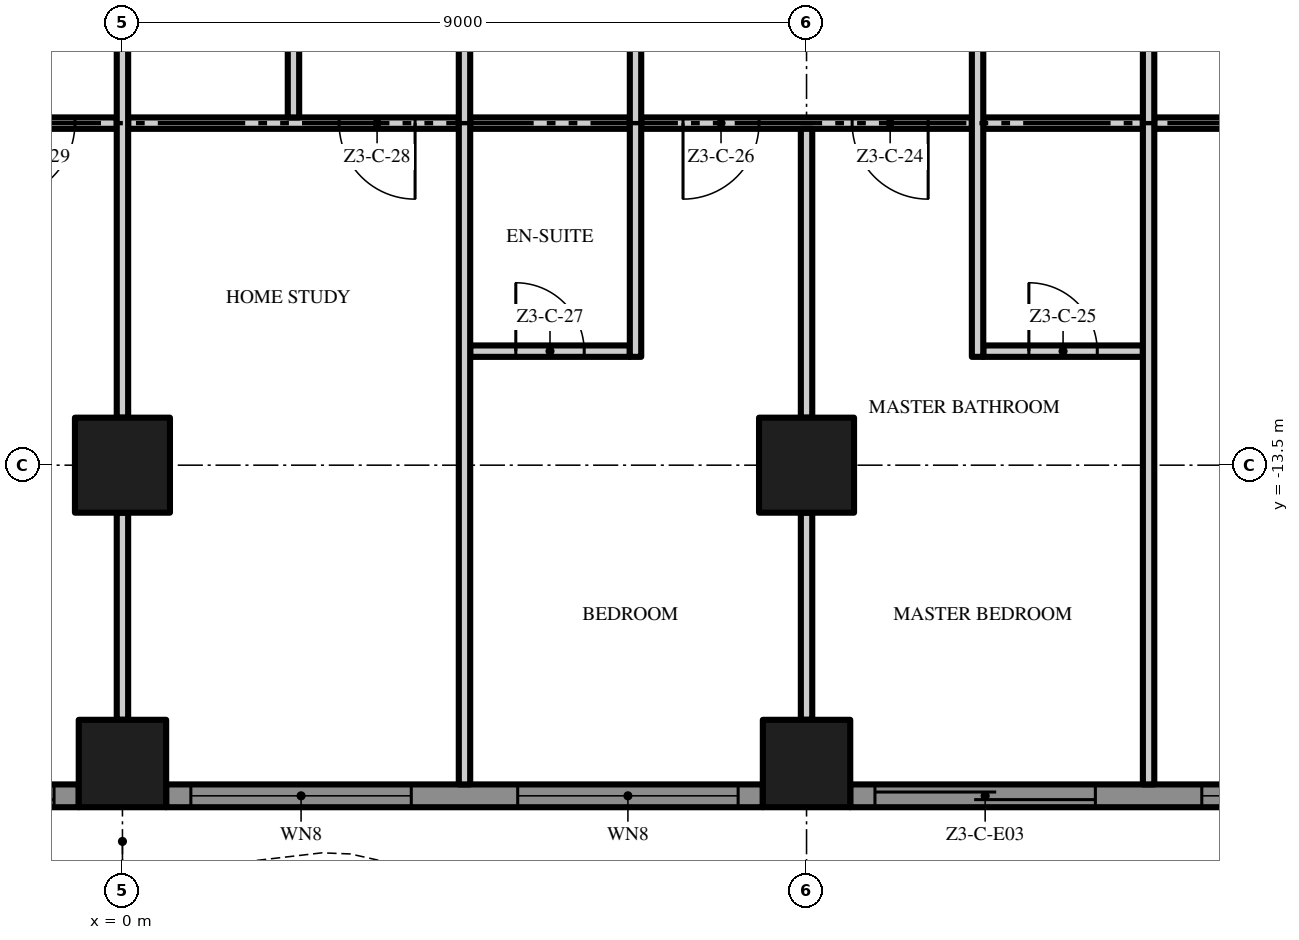
"""IFC4 building model, lengths in metres.
Left out: names, types, materials, properties, quantities, classifications, styles, units other than length and angle.
Written with IfcOpenShell. Run it as: python <this file> out.ifc"""

import sys

from ifc_helpers import new_model, si_unit, direction, frame, frame_2d, origin, origin_2d, place, context, subcontext, project, spatial, polyline, rectangle, outline, extrude, element, fill, save


model = new_model("IFC4")
c1 = context("Model", 3, precision=1e-05, world=origin(), true_north=direction((0.0, 1.0)))
c2 = subcontext(c1, "Body", "Model", "MODEL_VIEW")
j1 = project(units=[si_unit("LENGTHUNIT", "METRE"), si_unit("PLANEANGLEUNIT", "RADIAN")], contexts=[c1])
p1 = place(None, origin())
s1 = spatial("IfcSite", under=j1, at=p1, CompositionType="ELEMENT")
p2 = place(p1, origin())
s2 = spatial("IfcBuilding", under=s1, at=p2, CompositionType="ELEMENT")
p3 = place(p2, frame((0.0, 0.0, 155.4)))
s3 = spatial("IfcBuildingStorey", under=s2, at=p3, CompositionType="ELEMENT", Elevation=155.4)
p4 = place(p3, frame((0.0, -13.5, 0.0), z_axis=(0.0, 0.0, 1.0), x_axis=(1.0, 0.0, 0.0)))
e1 = element("IfcColumn", 1, at=p4, inside=s3, PredefinedType="COLUMN", context=c2, shape_type="SweptSolid", body=[
    extrude(rectangle(XDim=1.25, YDim=1.25, at=origin_2d()), origin(), (0.0, 0.0, 1.0), 3.5),
])
p5 = place(p3, frame((0.0, -17.425, 0.0), z_axis=(0.0, 0.0, 1.0), x_axis=(1.0, 0.0, 0.0)))
e2 = element("IfcColumn", 2, at=p5, inside=s3, PredefinedType="COLUMN", context=c2, shape_type="SweptSolid", body=[
    extrude(rectangle(XDim=1.15, YDim=1.15, at=origin_2d()), origin(), (0.0, 0.0, 1.0), 3.5),
])
p6 = place(p3, frame((9.0, -13.5, 0.0), z_axis=(0.0, 0.0, 1.0), x_axis=(1.0, 0.0, 0.0)))
e3 = element("IfcColumn", 3, at=p6, inside=s3, PredefinedType="COLUMN", context=c2, shape_type="SweptSolid", body=[
    extrude(rectangle(XDim=1.25, YDim=1.25, at=origin_2d()), origin(), (0.0, 0.0, 1.0), 3.5),
])
p7 = place(p3, frame((9.0, -17.425, 0.0), z_axis=(0.0, 0.0, 1.0), x_axis=(1.0, 0.0, 0.0)))
e4 = element("IfcColumn", 4, at=p7, inside=s3, PredefinedType="COLUMN", context=c2, shape_type="SweptSolid", body=[
    extrude(rectangle(XDim=1.15, YDim=1.15, at=origin_2d()), origin(), (0.0, 0.0, 1.0), 3.5),
])
p8 = place(p3, frame((-0.575, -17.85, 0.0), z_axis=(0.0, 0.0, 1.0), x_axis=(-1.0, 0.0, 0.0)))
e5 = element("IfcWall", 5, at=p8, inside=s3, PredefinedType="SOLIDWALL", context=c2, shape_type="SweptSolid", body=[
    extrude(rectangle(XDim=7.85, YDim=0.3, at=frame_2d((3.925, 0.0))), origin(), (0.0, 0.0, 1.0), 3.5),
])
p9 = place(p8, frame((4.625, 0.0, 0.0)))
e6 = element("IfcOpeningElement", 6, at=p9, cuts=e5, PredefinedType="OPENING", context=c2, shape_type="SweptSolid", body=[
    extrude(rectangle(XDim=2.9, YDim=2.4, at=frame_2d((1.45, 1.2))), frame((0.0, 0.16, 0.0), z_axis=(0.0, -1.0, 0.0), x_axis=(1.0, 0.0, 0.0)), (0.0, 0.0, 1.0), 0.32),
])
p10 = place(p8, frame((0.325, 0.0, 0.0)))
e7 = element("IfcOpeningElement", 7, at=p10, cuts=e5, PredefinedType="OPENING", context=c2, shape_type="SweptSolid", body=[
    extrude(rectangle(XDim=2.9, YDim=2.4, at=frame_2d((1.45, 1.2))), frame((0.0, 0.16, 0.0), z_axis=(0.0, -1.0, 0.0), x_axis=(1.0, 0.0, 0.0)), (0.0, 0.0, 1.0), 0.32),
])
p11 = place(p3, frame((8.425, -17.85, 0.0), z_axis=(0.0, 0.0, 1.0), x_axis=(-1.0, 0.0, 0.0)))
e8 = element("IfcWall", 8, at=p11, inside=s3, PredefinedType="SOLIDWALL", context=c2, shape_type="SweptSolid", body=[
    extrude(rectangle(XDim=7.85, YDim=0.3, at=frame_2d((3.925, 0.0))), origin(), (0.0, 0.0, 1.0), 3.5),
])
p12 = place(p11, frame((4.625, 0.0, 0.45)))
e9 = element("IfcOpeningElement", 9, at=p12, cuts=e8, PredefinedType="OPENING", context=c2, shape_type="SweptSolid", body=[
    extrude(rectangle(XDim=2.9, YDim=2.65, at=frame_2d((1.45, 1.325))), frame((0.0, 0.16, 0.0), z_axis=(0.0, -1.0, 0.0), x_axis=(1.0, 0.0, 0.0)), (0.0, 0.0, 1.0), 0.32),
])
p13 = place(p11, frame((0.325, 0.0, 0.45)))
e10 = element("IfcOpeningElement", 10, at=p13, cuts=e8, PredefinedType="OPENING", context=c2, shape_type="SweptSolid", body=[
    extrude(rectangle(XDim=2.9, YDim=2.65, at=frame_2d((1.45, 1.325))), frame((0.0, 0.16, 0.0), z_axis=(0.0, -1.0, 0.0), x_axis=(1.0, 0.0, 0.0)), (0.0, 0.0, 1.0), 0.32),
])
p14 = place(p3, frame((16.85, -17.85, 0.0), z_axis=(0.0, 0.0, 1.0), x_axis=(-1.0, 0.0, 0.0)))
e11 = element("IfcWall", 11, at=p14, inside=s3, PredefinedType="SOLIDWALL", context=c2, shape_type="SweptSolid", body=[
    extrude(rectangle(XDim=7.275, YDim=0.3, at=frame_2d((3.638, 0.0))), origin(), (0.0, 0.0, 1.0), 3.5),
])
p15 = place(p14, frame((4.05, 0.0, 0.0)))
e12 = element("IfcOpeningElement", 12, at=p15, cuts=e11, PredefinedType="OPENING", context=c2, shape_type="SweptSolid", body=[
    extrude(rectangle(XDim=2.9, YDim=2.4, at=frame_2d((1.45, 1.2))), frame((0.0, 0.16, 0.0), z_axis=(0.0, -1.0, 0.0), x_axis=(1.0, 0.0, 0.0)), (0.0, 0.0, 1.0), 0.32),
])
p16 = place(p14, frame((0.3, 0.0, 0.45)))
e13 = element("IfcOpeningElement", 13, at=p16, cuts=e11, PredefinedType="OPENING", context=c2, shape_type="SweptSolid", body=[
    extrude(rectangle(XDim=2.35, YDim=2.65, at=frame_2d((1.175, 1.325))), frame((0.0, 0.16, 0.0), z_axis=(0.0, -1.0, 0.0), x_axis=(1.0, 0.0, 0.0)), (0.0, 0.0, 1.0), 0.32),
])
p17 = place(p3, origin())
e14 = element("IfcWall", 14, at=p17, inside=s3, PredefinedType="USERDEFINED", context=c2, shape_type="SweptSolid", body=[
    extrude(outline(polyline([(-18.0, -20.649), (-16.5, -19.988), (-15.0, -19.255), (-13.5, -18.731), (-12.375, -18.6), (-12.0, -18.615), (-10.5, -18.951), (-9.0, -19.612), (-7.5, -20.345), (-6.0, -20.869), (-4.875, -21.0), (-4.5, -20.985), (-3.0, -20.649), (-1.5, -19.988), (0.0, -19.255), (1.5, -18.731), (2.625, -18.6), (3.0, -18.615), (4.5, -18.951), (6.0, -19.612), (7.5, -20.345), (9.0, -20.869), (10.125, -21.0), (10.5, -20.985), (12.0, -20.649), (13.5, -19.988), (15.0, -19.255), (16.5, -18.731), (17.625, -18.6), (18.0, -18.615), (18.01, -18.365), (17.615, -18.349), (16.444, -18.486), (14.904, -19.024), (13.395, -19.761), (11.921, -20.41), (10.467, -20.736), (10.135, -20.749), (9.056, -20.624), (7.596, -20.114), (6.105, -19.385), (4.579, -18.713), (3.033, -18.366), (2.615, -18.349), (1.444, -18.486), (-0.096, -19.024), (-1.605, -19.761), (-3.079, -20.41), (-4.533, -20.736), (-4.865, -20.749), (-5.944, -20.624), (-7.404, -20.114), (-8.895, -19.385), (-10.421, -18.713), (-11.967, -18.366), (-12.385, -18.349), (-13.556, -18.486), (-15.096, -19.024), (-16.605, -19.761), (-18.101, -20.42), (-18.0, -20.649)])), origin(), (0.0, 0.0, 1.0), 0.9),
])
p18 = place(p3, frame((4.575, -12.0, 0.0), z_axis=(0.0, 0.0, 1.0), x_axis=(1.0, 0.0, 0.0)))
e15 = element("IfcWall", 15, at=p18, inside=s3, PredefinedType="PARTITIONING", context=c2, shape_type="SweptSolid", body=[
    extrude(rectangle(XDim=2.1, YDim=0.15, at=frame_2d((1.05, 0.0))), origin(), (0.0, 0.0, 1.0), 3.5),
])
p19 = place(p18, frame((0.6, 0.0, 0.0)))
e16 = element("IfcOpeningElement", 16, at=p19, cuts=e15, PredefinedType="OPENING", context=c2, shape_type="SweptSolid", body=[
    extrude(rectangle(XDim=0.9, YDim=2.1, at=frame_2d((0.45, 1.05))), frame((0.0, 0.085, 0.0), z_axis=(0.0, -1.0, 0.0), x_axis=(1.0, 0.0, 0.0)), (0.0, 0.0, 1.0), 0.17),
])
p20 = place(p3, frame((11.325, -12.0, 0.0), z_axis=(0.0, 0.0, 1.0), x_axis=(1.0, 0.0, 0.0)))
e17 = element("IfcWall", 17, at=p20, inside=s3, PredefinedType="PARTITIONING", context=c2, shape_type="SweptSolid", body=[
    extrude(rectangle(XDim=2.1, YDim=0.15, at=frame_2d((1.05, 0.0))), origin(), (0.0, 0.0, 1.0), 3.5),
])
p21 = place(p20, frame((0.6, 0.0, 0.0)))
e18 = element("IfcOpeningElement", 18, at=p21, cuts=e17, PredefinedType="OPENING", context=c2, shape_type="SweptSolid", body=[
    extrude(rectangle(XDim=0.9, YDim=2.1, at=frame_2d((0.45, 1.05))), frame((0.0, 0.085, 0.0), z_axis=(0.0, -1.0, 0.0), x_axis=(1.0, 0.0, 0.0)), (0.0, 0.0, 1.0), 0.17),
])
p22 = place(p3, frame((-0.075, -9.0, 0.0), z_axis=(0.0, 0.0, 1.0), x_axis=(-1.0, 0.0, 0.0)))
e19 = element("IfcWall", 19, at=p22, inside=s3, PredefinedType="PARTITIONING", context=c2, shape_type="SweptSolid", body=[
    extrude(rectangle(XDim=2.1, YDim=0.15, at=frame_2d((1.05, 0.0))), origin(), (0.0, 0.0, 1.0), 3.5),
])
p23 = place(p22, frame((0.55, 0.0, 0.0)))
e20 = element("IfcOpeningElement", 20, at=p23, cuts=e19, PredefinedType="OPENING", context=c2, shape_type="SweptSolid", body=[
    extrude(rectangle(XDim=1.0, YDim=2.4, at=frame_2d((0.5, 1.2))), frame((0.0, 0.085, 0.0), z_axis=(0.0, -1.0, 0.0), x_axis=(1.0, 0.0, 0.0)), (0.0, 0.0, 1.0), 0.17),
])
p24 = place(p3, frame((4.425, -9.0, 0.0), z_axis=(0.0, 0.0, 1.0), x_axis=(-1.0, 0.0, 0.0)))
e21 = element("IfcWall", 21, at=p24, inside=s3, PredefinedType="PARTITIONING", context=c2, shape_type="SweptSolid", body=[
    extrude(rectangle(XDim=4.35, YDim=0.15, at=frame_2d((2.175, 0.0))), origin(), (0.0, 0.0, 1.0), 3.5),
])
p25 = place(p24, frame((0.575, 0.0, 0.0)))
e22 = element("IfcOpeningElement", 22, at=p25, cuts=e21, PredefinedType="OPENING", context=c2, shape_type="SweptSolid", body=[
    extrude(rectangle(XDim=1.0, YDim=2.4, at=frame_2d((0.5, 1.2))), frame((0.0, 0.085, 0.0), z_axis=(0.0, -1.0, 0.0), x_axis=(1.0, 0.0, 0.0)), (0.0, 0.0, 1.0), 0.17),
])
p26 = place(p3, frame((4.575, -9.0, 0.0), z_axis=(0.0, 0.0, 1.0), x_axis=(1.0, 0.0, 0.0)))
e23 = element("IfcWall", 23, at=p26, inside=s3, PredefinedType="PARTITIONING", context=c2, shape_type="SweptSolid", body=[
    extrude(rectangle(XDim=2.1, YDim=0.15, at=frame_2d((1.05, 0.0))), origin(), (0.0, 0.0, 1.0), 3.5),
])
p27 = place(p3, frame((11.175, -9.0, 0.0), z_axis=(0.0, 0.0, 1.0), x_axis=(-1.0, 0.0, 0.0)))
e24 = element("IfcWall", 24, at=p27, inside=s3, PredefinedType="PARTITIONING", context=c2, shape_type="SweptSolid", body=[
    extrude(rectangle(XDim=4.35, YDim=0.15, at=frame_2d((2.175, 0.0))), origin(), (0.0, 0.0, 1.0), 3.5),
])
p28 = place(p27, frame((0.575, 0.0, 0.0)))
e25 = element("IfcOpeningElement", 25, at=p28, cuts=e24, PredefinedType="OPENING", context=c2, shape_type="SweptSolid", body=[
    extrude(rectangle(XDim=1.0, YDim=2.4, at=frame_2d((0.5, 1.2))), frame((0.0, 0.085, 0.0), z_axis=(0.0, -1.0, 0.0), x_axis=(1.0, 0.0, 0.0)), (0.0, 0.0, 1.0), 0.17),
])
p29 = place(p27, frame((2.8, 0.0, 0.0)))
e26 = element("IfcOpeningElement", 26, at=p29, cuts=e24, PredefinedType="OPENING", context=c2, shape_type="SweptSolid", body=[
    extrude(rectangle(XDim=1.0, YDim=2.4, at=frame_2d((0.5, 1.2))), frame((0.0, 0.085, 0.0), z_axis=(0.0, -1.0, 0.0), x_axis=(1.0, 0.0, 0.0)), (0.0, 0.0, 1.0), 0.17),
])
p30 = place(p3, frame((11.325, -9.0, 0.0), z_axis=(0.0, 0.0, 1.0), x_axis=(1.0, 0.0, 0.0)))
e27 = element("IfcWall", 27, at=p30, inside=s3, PredefinedType="PARTITIONING", context=c2, shape_type="SweptSolid", body=[
    extrude(rectangle(XDim=2.1, YDim=0.15, at=frame_2d((1.05, 0.0))), origin(), (0.0, 0.0, 1.0), 3.5),
])
p31 = place(p3, frame((22.2, -9.0, 0.0), z_axis=(0.0, 0.0, 1.0), x_axis=(-1.0, 0.0, 0.0)))
e28 = element("IfcWall", 28, at=p31, inside=s3, PredefinedType="PARTITIONING", context=c2, shape_type="SweptSolid", body=[
    extrude(rectangle(XDim=8.625, YDim=0.15, at=frame_2d((4.312, 0.0))), origin(), (0.0, 0.0, 1.0), 3.5),
])
p32 = place(p31, frame((5.925, 0.0, 0.0)))
e29 = element("IfcOpeningElement", 29, at=p32, cuts=e28, PredefinedType="OPENING", context=c2, shape_type="SweptSolid", body=[
    extrude(rectangle(XDim=1.8, YDim=2.4, at=frame_2d((0.9, 1.2))), frame((0.0, 0.085, 0.0), z_axis=(0.0, -1.0, 0.0), x_axis=(1.0, 0.0, 0.0)), (0.0, 0.0, 1.0), 0.17),
])
p33 = place(p3, frame((0.0, -16.85, 0.0), z_axis=(0.0, 0.0, 1.0), x_axis=(0.0, 1.0, 0.0)))
e30 = element("IfcWall", 30, at=p33, inside=s3, PredefinedType="PARTITIONING", context=c2, shape_type="SweptSolid", body=[
    extrude(rectangle(XDim=2.725, YDim=0.15, at=frame_2d((1.363, 0.0))), origin(), (0.0, 0.0, 1.0), 3.5),
])
p34 = place(p3, frame((0.0, -12.875, 0.0), z_axis=(0.0, 0.0, 1.0), x_axis=(0.0, 1.0, 0.0)))
e31 = element("IfcWall", 31, at=p34, inside=s3, PredefinedType="PARTITIONING", context=c2, shape_type="SweptSolid", body=[
    extrude(rectangle(XDim=7.75, YDim=0.15, at=frame_2d((3.875, 0.0))), origin(), (0.0, 0.0, 1.0), 3.5),
])
p35 = place(p3, frame((2.25, -8.925, 0.0), z_axis=(0.0, 0.0, 1.0), x_axis=(0.0, 1.0, 0.0)))
e32 = element("IfcWall", 32, at=p35, inside=s3, PredefinedType="PARTITIONING", context=c2, shape_type="SweptSolid", body=[
    extrude(rectangle(XDim=4.5, YDim=0.15, at=frame_2d((2.25, 0.0))), origin(), (0.0, 0.0, 1.0), 3.5),
])
p36 = place(p3, frame((4.5, -17.7, 0.0), z_axis=(0.0, 0.0, 1.0), x_axis=(0.0, 1.0, 0.0)))
e33 = element("IfcWall", 33, at=p36, inside=s3, PredefinedType="PARTITIONING", context=c2, shape_type="SweptSolid", body=[
    extrude(rectangle(XDim=13.275, YDim=0.15, at=frame_2d((6.638, 0.0))), origin(), (0.0, 0.0, 1.0), 3.5),
])
p37 = place(p3, frame((6.75, -12.075, 0.0), z_axis=(0.0, 0.0, 1.0), x_axis=(0.0, 1.0, 0.0)))
e34 = element("IfcWall", 34, at=p37, inside=s3, PredefinedType="PARTITIONING", context=c2, shape_type="SweptSolid", body=[
    extrude(rectangle(XDim=7.65, YDim=0.15, at=frame_2d((3.825, 0.0))), origin(), (0.0, 0.0, 1.0), 3.5),
])
p38 = place(p3, frame((9.0, -16.85, 0.0), z_axis=(0.0, 0.0, 1.0), x_axis=(0.0, 1.0, 0.0)))
e35 = element("IfcWall", 35, at=p38, inside=s3, PredefinedType="PARTITIONING", context=c2, shape_type="SweptSolid", body=[
    extrude(rectangle(XDim=2.725, YDim=0.15, at=frame_2d((1.363, 0.0))), origin(), (0.0, 0.0, 1.0), 3.5),
])
p39 = place(p3, frame((9.0, -12.875, 0.0), z_axis=(0.0, 0.0, 1.0), x_axis=(0.0, 1.0, 0.0)))
e36 = element("IfcWall", 36, at=p39, inside=s3, PredefinedType="PARTITIONING", context=c2, shape_type="SweptSolid", body=[
    extrude(rectangle(XDim=3.8, YDim=0.15, at=frame_2d((1.9, 0.0))), origin(), (0.0, 0.0, 1.0), 3.5),
])
p40 = place(p3, frame((11.25, -12.075, 0.0), z_axis=(0.0, 0.0, 1.0), x_axis=(0.0, 1.0, 0.0)))
e37 = element("IfcWall", 37, at=p40, inside=s3, PredefinedType="PARTITIONING", context=c2, shape_type="SweptSolid", body=[
    extrude(rectangle(XDim=7.65, YDim=0.15, at=frame_2d((3.825, 0.0))), origin(), (0.0, 0.0, 1.0), 3.5),
])
p41 = place(p3, frame((13.5, -17.7, 0.0), z_axis=(0.0, 0.0, 1.0), x_axis=(0.0, 1.0, 0.0)))
e38 = element("IfcWall", 38, at=p41, inside=s3, PredefinedType="PARTITIONING", context=c2, shape_type="SweptSolid", body=[
    extrude(rectangle(XDim=13.275, YDim=0.15, at=frame_2d((6.638, 0.0))), origin(), (0.0, 0.0, 1.0), 3.5),
])
p42 = place(p41, frame((10.5, 0.0, 0.0)))
e39 = element("IfcOpeningElement", 39, at=p42, cuts=e38, PredefinedType="OPENING", context=c2, shape_type="SweptSolid", body=[
    extrude(rectangle(XDim=0.9, YDim=2.1, at=frame_2d((0.45, 1.05))), frame((0.0, 0.085, 0.0), z_axis=(0.0, -1.0, 0.0), x_axis=(1.0, 0.0, 0.0)), (0.0, 0.0, 1.0), 0.17),
])
p43 = place(p10, origin())
e40 = element("IfcDoor", 40, at=p43, inside=s3, OperationType="SINGLE_SWING_LEFT", PredefinedType="DOOR", context=c2, shape_type="SweptSolid", body=[
    extrude(rectangle(XDim=2.9, YDim=2.4, at=frame_2d((1.45, 1.2))), frame((0.0, 0.025, 0.0), z_axis=(0.0, -1.0, 0.0), x_axis=(1.0, 0.0, 0.0)), (0.0, 0.0, 1.0), 0.05),
])
fill(e7, e40)
p44 = place(p12, origin())
e41 = element("IfcWindow", 41, at=p44, inside=s3, PartitioningType="SINGLE_PANEL", PredefinedType="WINDOW", context=c2, shape_type="SweptSolid", body=[
    extrude(rectangle(XDim=2.9, YDim=2.65, at=frame_2d((1.45, 1.325))), frame((0.0, 0.03, 0.0), z_axis=(0.0, -1.0, 0.0), x_axis=(1.0, 0.0, 0.0)), (0.0, 0.0, 1.0), 0.06),
])
fill(e9, e41)
p45 = place(p13, origin())
e42 = element("IfcWindow", 42, at=p45, inside=s3, PartitioningType="SINGLE_PANEL", PredefinedType="WINDOW", context=c2, shape_type="SweptSolid", body=[
    extrude(rectangle(XDim=2.9, YDim=2.65, at=frame_2d((1.45, 1.325))), frame((0.0, 0.03, 0.0), z_axis=(0.0, -1.0, 0.0), x_axis=(1.0, 0.0, 0.0)), (0.0, 0.0, 1.0), 0.06),
])
fill(e10, e42)
p46 = place(p15, origin())
e43 = element("IfcDoor", 43, at=p46, inside=s3, OperationType="SINGLE_SWING_LEFT", PredefinedType="DOOR", context=c2, shape_type="SweptSolid", body=[
    extrude(rectangle(XDim=2.9, YDim=2.4, at=frame_2d((1.45, 1.2))), frame((0.0, 0.025, 0.0), z_axis=(0.0, -1.0, 0.0), x_axis=(1.0, 0.0, 0.0)), (0.0, 0.0, 1.0), 0.05),
])
fill(e12, e43)
p47 = place(p16, origin())
e44 = element("IfcWindow", 44, at=p47, inside=s3, PartitioningType="SINGLE_PANEL", PredefinedType="WINDOW", context=c2, shape_type="SweptSolid", body=[
    extrude(rectangle(XDim=2.35, YDim=2.65, at=frame_2d((1.175, 1.325))), frame((0.0, 0.03, 0.0), z_axis=(0.0, -1.0, 0.0), x_axis=(1.0, 0.0, 0.0)), (0.0, 0.0, 1.0), 0.06),
])
fill(e13, e44)
p48 = place(p28, origin())
e45 = element("IfcDoor", 45, at=p48, inside=s3, OperationType="SINGLE_SWING_LEFT", PredefinedType="DOOR", context=c2, shape_type="SweptSolid", body=[
    extrude(rectangle(XDim=1.0, YDim=2.4, at=frame_2d((0.5, 1.2))), frame((0.0, 0.025, 0.0), z_axis=(0.0, -1.0, 0.0), x_axis=(1.0, 0.0, 0.0)), (0.0, 0.0, 1.0), 0.05),
])
fill(e25, e45)
p49 = place(p21, origin())
e46 = element("IfcDoor", 46, at=p49, inside=s3, OperationType="SINGLE_SWING_LEFT", PredefinedType="DOOR", context=c2, shape_type="SweptSolid", body=[
    extrude(rectangle(XDim=0.9, YDim=2.1, at=frame_2d((0.45, 1.05))), frame((0.0, 0.025, 0.0), z_axis=(0.0, -1.0, 0.0), x_axis=(1.0, 0.0, 0.0)), (0.0, 0.0, 1.0), 0.05),
])
fill(e18, e46)
p50 = place(p29, origin())
e47 = element("IfcDoor", 47, at=p50, inside=s3, OperationType="SINGLE_SWING_RIGHT", PredefinedType="DOOR", context=c2, shape_type="SweptSolid", body=[
    extrude(rectangle(XDim=1.0, YDim=2.4, at=frame_2d((0.5, 1.2))), frame((0.0, 0.025, 0.0), z_axis=(0.0, -1.0, 0.0), x_axis=(1.0, 0.0, 0.0)), (0.0, 0.0, 1.0), 0.05),
])
fill(e26, e47)
p51 = place(p19, origin())
e48 = element("IfcDoor", 48, at=p51, inside=s3, OperationType="SINGLE_SWING_LEFT", PredefinedType="DOOR", context=c2, shape_type="SweptSolid", body=[
    extrude(rectangle(XDim=0.9, YDim=2.1, at=frame_2d((0.45, 1.05))), frame((0.0, 0.025, 0.0), z_axis=(0.0, -1.0, 0.0), x_axis=(1.0, 0.0, 0.0)), (0.0, 0.0, 1.0), 0.05),
])
fill(e16, e48)
p52 = place(p25, origin())
e49 = element("IfcDoor", 49, at=p52, inside=s3, OperationType="SINGLE_SWING_LEFT", PredefinedType="DOOR", context=c2, shape_type="SweptSolid", body=[
    extrude(rectangle(XDim=1.0, YDim=2.4, at=frame_2d((0.5, 1.2))), frame((0.0, 0.025, 0.0), z_axis=(0.0, -1.0, 0.0), x_axis=(1.0, 0.0, 0.0)), (0.0, 0.0, 1.0), 0.05),
])
fill(e22, e49)
p53 = place(p23, origin())
e50 = element("IfcDoor", 50, at=p53, inside=s3, OperationType="SINGLE_SWING_RIGHT", PredefinedType="DOOR", context=c2, shape_type="SweptSolid", body=[
    extrude(rectangle(XDim=1.0, YDim=2.4, at=frame_2d((0.5, 1.2))), frame((0.0, 0.025, 0.0), z_axis=(0.0, -1.0, 0.0), x_axis=(1.0, 0.0, 0.0)), (0.0, 0.0, 1.0), 0.05),
])
fill(e20, e50)
save(model, sys.argv[1])
